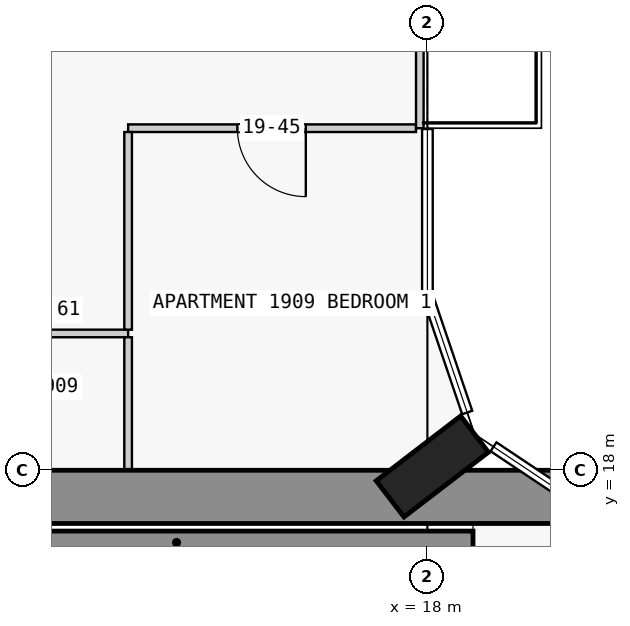
"""IFC4 building model, lengths in metres.
Left out: names, types, materials, properties, quantities, classifications, styles, units other than length and angle.
Written with IfcOpenShell. Run it as: python <this file> out.ifc"""

import sys

from ifc_helpers import new_model, si_unit, direction, frame, frame_2d, origin, origin_2d, place, context, subcontext, project, spatial, rectangle, extrude, element, fill, save


model = new_model("IFC4")
c1 = context("Model", 3, precision=1e-05, world=origin(), true_north=direction((0.0, 1.0)))
c2 = subcontext(c1, "Body", "Model", "MODEL_VIEW")
j1 = project(units=[si_unit("LENGTHUNIT", "METRE"), si_unit("PLANEANGLEUNIT", "RADIAN")], contexts=[c1])
p1 = place(None, origin())
s1 = spatial("IfcSite", under=j1, at=p1, CompositionType="ELEMENT")
p2 = place(p1, origin())
s2 = spatial("IfcBuilding", under=s1, at=p2, CompositionType="ELEMENT")
p3 = place(p2, frame((0.0, 0.0, 78.3)))
s3 = spatial("IfcBuildingStorey", under=s2, at=p3, CompositionType="ELEMENT", Elevation=78.3)
p4 = place(p3, frame((18.065, 18.05, 0.0), z_axis=(0.0, 0.0, 1.0), x_axis=(-0.608810846443, 0.793315418515, 0.0)))
e1 = element("IfcColumn", 1, at=p4, inside=s3, PredefinedType="COLUMN", context=c2, shape_type="SweptSolid", body=[
    extrude(rectangle(XDim=0.6, YDim=1.4, at=origin_2d()), origin(), (0.0, 0.0, 1.0), 3.5),
])
p5 = place(p3, frame((1.6, 17.65, 0.0), z_axis=(0.0, 0.0, 1.0), x_axis=(1.0, 0.0, 0.0)))
e2 = element("IfcWall", 2, at=p5, inside=s3, PredefinedType="SHEAR", context=c2, shape_type="SweptSolid", body=[
    extrude(rectangle(XDim=20.9, YDim=0.7, at=frame_2d((10.45, 0.0))), origin(), (0.0, 0.0, 1.0), 3.25),
])
p6 = place(p5, frame((6.5, 0.0, 0.0)))
e3 = element("IfcOpeningElement", 3, at=p6, cuts=e2, PredefinedType="OPENING", context=c2, shape_type="SweptSolid", body=[
    extrude(rectangle(XDim=1.8, YDim=2.1, at=frame_2d((0.9, 1.05))), frame((0.0, 0.36, 0.0), z_axis=(0.0, -1.0, 0.0), x_axis=(1.0, 0.0, 0.0)), (0.0, 0.0, 1.0), 0.72),
])
p7 = place(p3, frame((10.8, 17.05, 0.0), z_axis=(0.0, 0.0, 1.0), x_axis=(1.0, 0.0, 0.0)))
e4 = element("IfcWall", 4, at=p7, inside=s3, PredefinedType="SHEAR", context=c2, shape_type="SweptSolid", body=[
    extrude(rectangle(XDim=7.8, YDim=0.3, at=frame_2d((3.9, 0.0))), origin(), (0.0, 0.0, 1.0), 3.25),
])
p8 = place(p3, frame((17.9, 27.0, 0.0), z_axis=(0.0, 0.0, 1.0), x_axis=(0.0, -1.0, 0.0)))
e5 = element("IfcWall", 5, at=p8, inside=s3, PredefinedType="STANDARD", context=c2, shape_type="SweptSolid", body=[
    extrude(rectangle(XDim=4.5, YDim=0.1, at=frame_2d((2.25, 0.0))), origin(), (0.0, 0.0, 1.0), 3.25),
])
p9 = place(p8, frame((1.05, 0.0, 0.0)))
e6 = element("IfcOpeningElement", 6, at=p9, cuts=e5, PredefinedType="OPENING", context=c2, shape_type="SweptSolid", body=[
    extrude(rectangle(XDim=2.4, YDim=2.4, at=frame_2d((1.2, 1.2))), frame((0.0, 0.06, 0.0), z_axis=(0.0, -1.0, 0.0), x_axis=(1.0, 0.0, 0.0)), (0.0, 0.0, 1.0), 0.12),
])
p10 = place(p3, frame((14.062, 19.8, 0.0), z_axis=(0.0, 0.0, 1.0), x_axis=(-1.0, 0.0, 0.0)))
e7 = element("IfcWall", 7, at=p10, inside=s3, PredefinedType="PARTITIONING", context=c2, shape_type="SweptSolid", body=[
    extrude(rectangle(XDim=3.4, YDim=0.1, at=frame_2d((1.7, 0.0))), origin(), (0.0, 0.0, 1.0), 3.25),
])
p11 = place(p10, frame((1.25, 0.0, 0.0)))
e8 = element("IfcOpeningElement", 8, at=p11, cuts=e7, PredefinedType="OPENING", context=c2, shape_type="SweptSolid", body=[
    extrude(rectangle(XDim=0.9, YDim=2.1, at=frame_2d((0.45, 1.05))), frame((0.0, 0.06, 0.0), z_axis=(0.0, -1.0, 0.0), x_axis=(1.0, 0.0, 0.0)), (0.0, 0.0, 1.0), 0.12),
])
p12 = place(p3, frame((17.85, 22.5, 0.0), z_axis=(0.0, 0.0, 1.0), x_axis=(-1.0, 0.0, 0.0)))
e9 = element("IfcWall", 9, at=p12, inside=s3, PredefinedType="PARTITIONING", context=c2, shape_type="SweptSolid", body=[
    extrude(rectangle(XDim=3.788, YDim=0.1, at=frame_2d((1.894, 0.0))), origin(), (0.0, 0.0, 1.0), 3.25),
])
p13 = place(p12, frame((1.45, 0.0, 0.0)))
e10 = element("IfcOpeningElement", 10, at=p13, cuts=e9, PredefinedType="OPENING", context=c2, shape_type="SweptSolid", body=[
    extrude(rectangle(XDim=0.9, YDim=2.1, at=frame_2d((0.45, 1.05))), frame((0.0, 0.06, 0.0), z_axis=(0.0, -1.0, 0.0), x_axis=(1.0, 0.0, 0.0)), (0.0, 0.0, 1.0), 0.12),
])
p14 = place(p3, frame((14.062, 22.45, 0.0), z_axis=(0.0, 0.0, 1.0), x_axis=(0.0, -1.0, 0.0)))
e11 = element("IfcWall", 11, at=p14, inside=s3, PredefinedType="PARTITIONING", context=c2, shape_type="SweptSolid", body=[
    extrude(rectangle(XDim=2.6, YDim=0.1, at=frame_2d((1.3, 0.0))), origin(), (0.0, 0.0, 1.0), 3.25),
])
p15 = place(p3, frame((14.062, 18.0, 0.0), z_axis=(0.0, 0.0, 1.0), x_axis=(0.0, 1.0, 0.0)))
e12 = element("IfcWall", 12, at=p15, inside=s3, PredefinedType="PARTITIONING", context=c2, shape_type="SweptSolid", body=[
    extrude(rectangle(XDim=1.75, YDim=0.1, at=frame_2d((0.875, 0.0))), origin(), (0.0, 0.0, 1.0), 3.25),
])
p16 = place(p13, origin())
e13 = element("IfcDoor", 13, at=p16, inside=s3, OperationType="SINGLE_SWING_RIGHT", PredefinedType="DOOR", context=c2, shape_type="SweptSolid", body=[
    extrude(rectangle(XDim=0.9, YDim=2.1, at=frame_2d((0.45, 1.05))), frame((0.0, 0.025, 0.0), z_axis=(0.0, -1.0, 0.0), x_axis=(1.0, 0.0, 0.0)), (0.0, 0.0, 1.0), 0.05),
])
fill(e10, e13)
save(model, sys.argv[1])
